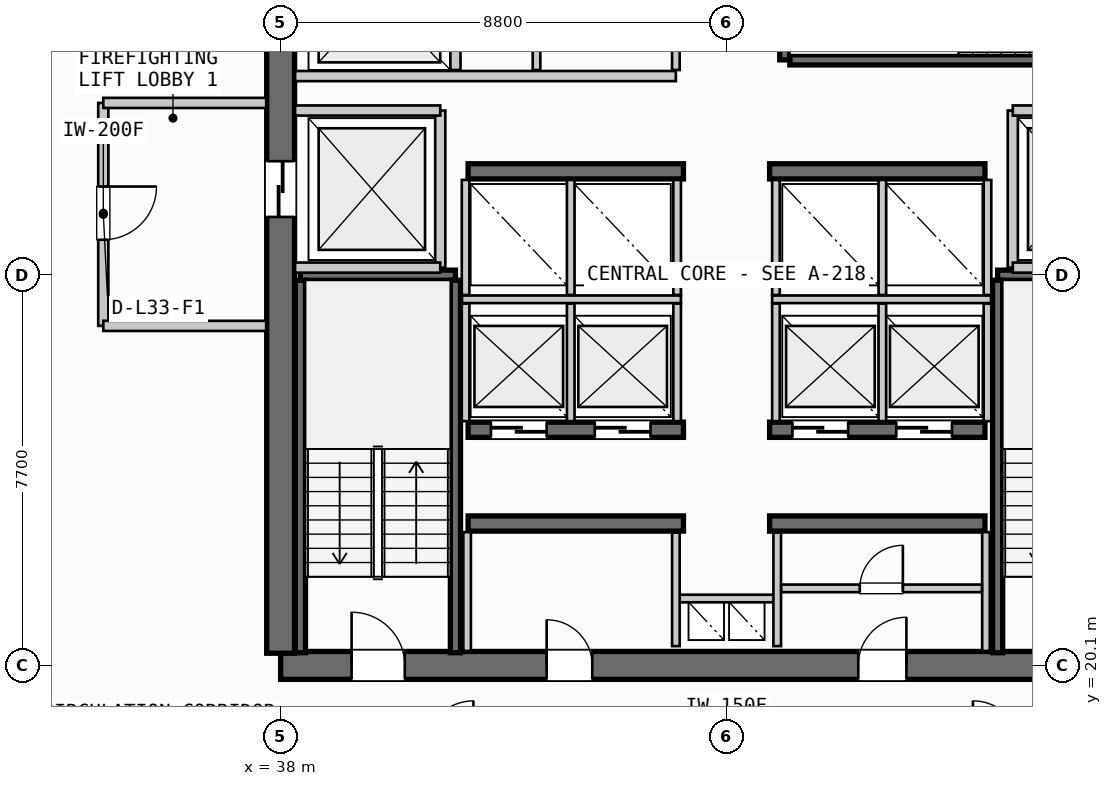
"""IFC4 building model, lengths in metres.
Left out: names, types, materials, properties, quantities, classifications, styles, units other than length and angle.
Written with IfcOpenShell. Run it as: python <this file> out.ifc"""

import sys

from ifc_helpers import new_model, si_unit, direction, frame, frame_2d, origin, place, context, subcontext, project, spatial, rectangle, extrude, source, transform, mapped, element, fill, save


model = new_model("IFC4")
c1 = context("Model", 3, precision=1e-05, world=origin(), true_north=direction((0.0, 1.0)))
c2 = subcontext(c1, "Body", "Model", "MODEL_VIEW")
j1 = project(units=[si_unit("LENGTHUNIT", "METRE"), si_unit("PLANEANGLEUNIT", "RADIAN")], contexts=[c1])
p1 = place(None, origin())
s1 = spatial("IfcSite", under=j1, at=p1, CompositionType="ELEMENT")
p2 = place(p1, origin())
s2 = spatial("IfcBuilding", under=s1, at=p2, CompositionType="ELEMENT")
p3 = place(p2, frame((0.0, 0.0, 132.35)))
s3 = spatial("IfcBuildingStorey", under=s2, at=p3, CompositionType="ELEMENT", Elevation=132.35)
p4 = place(p3, frame((38.0, 20.1, 0.0), z_axis=(0.0, 0.0, 1.0), x_axis=(1.0, 0.0, 0.0)))
e1 = element("IfcWall", 1, at=p4, inside=s3, PredefinedType="SHEAR", context=c2, shape_type="SweptSolid", body=[
    extrude(rectangle(XDim=17.6, YDim=0.55, at=frame_2d((8.8, 0.0))), origin(), (0.0, 0.0, 1.0), 3.3),
])
p5 = place(p4, frame((1.4, 0.0, 0.0)))
e2 = element("IfcOpeningElement", 2, at=p5, cuts=e1, PredefinedType="OPENING", context=c2, shape_type="SweptSolid", body=[
    extrude(rectangle(XDim=1.05, YDim=2.15, at=frame_2d((0.525, 1.075))), frame((0.0, 0.285, 0.0), z_axis=(0.0, -1.0, 0.0), x_axis=(1.0, 0.0, 0.0)), (0.0, 0.0, 1.0), 0.57),
])
p6 = place(p4, frame((15.15, 0.0, 0.0)))
e3 = element("IfcOpeningElement", 3, at=p6, cuts=e1, PredefinedType="OPENING", context=c2, shape_type="SweptSolid", body=[
    extrude(rectangle(XDim=1.05, YDim=2.15, at=frame_2d((0.525, 1.075))), frame((0.0, 0.285, 0.0), z_axis=(0.0, -1.0, 0.0), x_axis=(1.0, 0.0, 0.0)), (0.0, 0.0, 1.0), 0.57),
])
p7 = place(p4, frame((5.25, 0.0, 0.0)))
e4 = element("IfcOpeningElement", 4, at=p7, cuts=e1, PredefinedType="OPENING", context=c2, shape_type="SweptSolid", body=[
    extrude(rectangle(XDim=0.9, YDim=2.15, at=frame_2d((0.45, 1.075))), frame((0.0, 0.285, 0.0), z_axis=(0.0, -1.0, 0.0), x_axis=(1.0, 0.0, 0.0)), (0.0, 0.0, 1.0), 0.57),
])
p8 = place(p4, frame((11.4, 0.0, 0.0)))
e5 = element("IfcOpeningElement", 5, at=p8, cuts=e1, PredefinedType="OPENING", context=c2, shape_type="SweptSolid", body=[
    extrude(rectangle(XDim=0.95, YDim=2.15, at=frame_2d((0.475, 1.075))), frame((0.0, 0.285, 0.0), z_axis=(0.0, -1.0, 0.0), x_axis=(1.0, 0.0, 0.0)), (0.0, 0.0, 1.0), 0.57),
])
p9 = place(p3, frame((38.0, 35.26, 0.0), z_axis=(0.0, 0.0, 1.0), x_axis=(0.0, -1.0, 0.0)))
e6 = element("IfcWall", 6, at=p9, inside=s3, PredefinedType="SHEAR", context=c2, shape_type="SweptSolid", body=[
    extrude(rectangle(XDim=14.92, YDim=0.55, at=frame_2d((7.46, 0.0))), origin(), (0.0, 0.0, 1.0), 3.3),
])
p10 = place(p9, frame((5.21, 0.0, 0.0)))
e7 = element("IfcOpeningElement", 7, at=p10, cuts=e6, PredefinedType="OPENING", context=c2, shape_type="SweptSolid", body=[
    extrude(rectangle(XDim=1.1, YDim=2.2, at=frame_2d((0.55, 1.1))), frame((0.0, 0.285, 0.0), z_axis=(0.0, -1.0, 0.0), x_axis=(1.0, 0.0, 0.0)), (0.0, 0.0, 1.0), 0.57),
])
for number, where, z_axis, x_axis in (
    (8, (41.7, 22.9, 0.0), (0.0, 0.0, 1.0), (1.0, 0.0, 0.0)),
    (9, (47.65, 22.9, 0.0), (0.0, 0.0, 1.0), (1.0, 0.0, 0.0)),
):
    element("IfcWall", number, at=place(p3, frame(where, z_axis=z_axis, x_axis=x_axis)), inside=s3, PredefinedType="SHEAR", context=c2, shape_type="SweptSolid", body=[
        extrude(rectangle(XDim=4.25, YDim=0.3, at=frame_2d((2.125, 0.0))), origin(), (0.0, 0.0, 1.0), 3.3),
    ])
p11 = place(p3, frame((41.7, 24.75, 0.0), z_axis=(0.0, 0.0, 1.0), x_axis=(1.0, 0.0, 0.0)))
e10 = element("IfcWall", 10, at=p11, inside=s3, PredefinedType="SHEAR", context=c2, shape_type="SweptSolid", body=[
    extrude(rectangle(XDim=4.25, YDim=0.3, at=frame_2d((2.125, 0.0))), origin(), (0.0, 0.0, 1.0), 3.3),
])
p12 = place(p11, frame((0.45, 0.0, 0.0)))
e11 = element("IfcOpeningElement", 11, at=p12, cuts=e10, PredefinedType="OPENING", context=c2, shape_type="SweptSolid", body=[
    extrude(rectangle(XDim=1.1, YDim=2.2, at=frame_2d((0.55, 1.1))), frame((0.0, 0.16, 0.0), z_axis=(0.0, -1.0, 0.0), x_axis=(1.0, 0.0, 0.0)), (0.0, 0.0, 1.0), 0.32),
])
p13 = place(p11, frame((2.5, 0.0, 0.0)))
e12 = element("IfcOpeningElement", 12, at=p13, cuts=e10, PredefinedType="OPENING", context=c2, shape_type="SweptSolid", body=[
    extrude(rectangle(XDim=1.1, YDim=2.2, at=frame_2d((0.55, 1.1))), frame((0.0, 0.16, 0.0), z_axis=(0.0, -1.0, 0.0), x_axis=(1.0, 0.0, 0.0)), (0.0, 0.0, 1.0), 0.32),
])
p14 = place(p3, frame((47.65, 24.75, 0.0), z_axis=(0.0, 0.0, 1.0), x_axis=(1.0, 0.0, 0.0)))
e13 = element("IfcWall", 13, at=p14, inside=s3, PredefinedType="SHEAR", context=c2, shape_type="SweptSolid", body=[
    extrude(rectangle(XDim=4.25, YDim=0.3, at=frame_2d((2.125, 0.0))), origin(), (0.0, 0.0, 1.0), 3.3),
])
p15 = place(p14, frame((0.45, 0.0, 0.0)))
e14 = element("IfcOpeningElement", 14, at=p15, cuts=e13, PredefinedType="OPENING", context=c2, shape_type="SweptSolid", body=[
    extrude(rectangle(XDim=1.1, YDim=2.2, at=frame_2d((0.55, 1.1))), frame((0.0, 0.16, 0.0), z_axis=(0.0, -1.0, 0.0), x_axis=(1.0, 0.0, 0.0)), (0.0, 0.0, 1.0), 0.32),
])
p16 = place(p14, frame((2.5, 0.0, 0.0)))
e15 = element("IfcOpeningElement", 15, at=p16, cuts=e13, PredefinedType="OPENING", context=c2, shape_type="SweptSolid", body=[
    extrude(rectangle(XDim=1.1, YDim=2.2, at=frame_2d((0.55, 1.1))), frame((0.0, 0.16, 0.0), z_axis=(0.0, -1.0, 0.0), x_axis=(1.0, 0.0, 0.0)), (0.0, 0.0, 1.0), 0.32),
])
for number, where, z_axis, x_axis in (
    (16, (41.7, 29.85, 0.0), (0.0, 0.0, 1.0), (1.0, 0.0, 0.0)),
    (17, (47.65, 29.85, 0.0), (0.0, 0.0, 1.0), (1.0, 0.0, 0.0)),
):
    element("IfcWall", number, at=place(p3, frame(where, z_axis=z_axis, x_axis=x_axis)), inside=s3, PredefinedType="SHEAR", context=c2, shape_type="SweptSolid", body=[
        extrude(rectangle(XDim=4.25, YDim=0.3, at=frame_2d((2.125, 0.0))), origin(), (0.0, 0.0, 1.0), 3.3),
    ])
p17 = place(p3, frame((38.39, 27.8, 0.0), z_axis=(0.0, 0.0, 1.0), x_axis=(1.0, 0.0, 0.0)))
e18 = element("IfcWall", 18, at=p17, inside=s3, PredefinedType="SHEAR", context=c2, shape_type="SweptSolid", body=[
    extrude(rectangle(XDim=3.06, YDim=0.2, at=frame_2d((1.53, 0.0))), origin(), (0.0, 0.0, 1.0), 3.3),
])
for number, where, z_axis, x_axis in (
    (19, (41.45, 27.7, 0.0), (0.0, 0.0, 1.0), (0.0, -1.0, 0.0)),
    (20, (38.39, 20.35, 0.0), (0.0, 0.0, 1.0), (0.0, 1.0, 0.0)),
):
    element("IfcWall", number, at=place(p3, frame(where, z_axis=z_axis, x_axis=x_axis)), inside=s3, PredefinedType="SHEAR", context=c2, shape_type="SweptSolid", body=[
        extrude(rectangle(XDim=7.35, YDim=0.2, at=frame_2d((3.675, 0.0))), origin(), (0.0, 0.0, 1.0), 3.3),
    ])
p18 = place(p3, frame((52.15, 27.8, 0.0), z_axis=(0.0, 0.0, 1.0), x_axis=(1.0, 0.0, 0.0)))
e21 = element("IfcWall", 21, at=p18, inside=s3, PredefinedType="SHEAR", context=c2, shape_type="SweptSolid", body=[
    extrude(rectangle(XDim=3.06, YDim=0.2, at=frame_2d((1.53, 0.0))), origin(), (0.0, 0.0, 1.0), 3.3),
])
p19 = place(p3, frame((52.15, 20.35, 0.0), z_axis=(0.0, 0.0, 1.0), x_axis=(0.0, 1.0, 0.0)))
e22 = element("IfcWall", 22, at=p19, inside=s3, PredefinedType="SHEAR", context=c2, shape_type="SweptSolid", body=[
    extrude(rectangle(XDim=7.35, YDim=0.2, at=frame_2d((3.675, 0.0))), origin(), (0.0, 0.0, 1.0), 3.3),
])
p20 = place(p3, frame((47.95, 32.05, 0.0), z_axis=(0.0, 0.0, 1.0), x_axis=(0.0, 1.0, 0.0)))
e23 = element("IfcWall", 23, at=p20, inside=s3, PredefinedType="SHEAR", context=c2, shape_type="SweptSolid", body=[
    extrude(rectangle(XDim=3.06, YDim=0.2, at=frame_2d((1.53, 0.0))), origin(), (0.0, 0.0, 1.0), 3.3),
])
p21 = place(p3, frame((55.4, 32.05, 0.0), z_axis=(0.0, 0.0, 1.0), x_axis=(-1.0, 0.0, 0.0)))
e24 = element("IfcWall", 24, at=p21, inside=s3, PredefinedType="SHEAR", context=c2, shape_type="SweptSolid", body=[
    extrude(rectangle(XDim=7.35, YDim=0.2, at=frame_2d((3.675, 0.0))), origin(), (0.0, 0.0, 1.0), 3.3),
])
p22 = place(p3, frame((45.8, 21.42, 0.0), z_axis=(0.0, 0.0, 1.0), x_axis=(1.0, 0.0, 0.0)))
e25 = element("IfcWall", 25, at=p22, inside=s3, PredefinedType="PARTITIONING", context=c2, shape_type="SweptSolid", body=[
    extrude(rectangle(XDim=2.0, YDim=0.15, at=frame_2d((1.0, 0.0))), origin(), (0.0, 0.0, 1.0), 2.445),
])
for number, where, z_axis, x_axis in (
    (26, (45.8, 20.48, 0.0), (0.0, 0.0, 1.0), (0.0, 1.0, 0.0)),
    (27, (47.8, 20.48, 0.0), (0.0, 0.0, 1.0), (0.0, 1.0, 0.0)),
):
    element("IfcWall", number, at=place(p3, frame(where, z_axis=z_axis, x_axis=x_axis)), inside=s3, PredefinedType="PARTITIONING", context=c2, shape_type="SweptSolid", body=[
        extrude(rectangle(XDim=2.24, YDim=0.15, at=frame_2d((1.12, 0.0))), origin(), (0.0, 0.0, 1.0), 2.445),
    ])
p23 = place(p3, frame((41.15, 27.95, 0.0), z_axis=(0.0, 0.0, 1.0), x_axis=(0.0, 1.0, 0.0)))
e28 = element("IfcWall", 28, at=p23, inside=s3, PredefinedType="PARTITIONING", context=c2, shape_type="SweptSolid", body=[
    extrude(rectangle(XDim=3.1, YDim=0.2, at=frame_2d((1.55, 0.0))), origin(), (0.0, 0.0, 1.0), 2.445),
])
for number, where, z_axis, x_axis in (
    (29, (38.285, 27.95, 0.0), (0.0, 0.0, 1.0), (1.0, 0.0, 0.0)),
    (30, (38.285, 31.05, 0.0), (0.0, 0.0, 1.0), (1.0, 0.0, 0.0)),
):
    element("IfcWall", number, at=place(p3, frame(where, z_axis=z_axis, x_axis=x_axis)), inside=s3, PredefinedType="PARTITIONING", context=c2, shape_type="SweptSolid", body=[
        extrude(rectangle(XDim=2.865, YDim=0.2, at=frame_2d((1.433, 0.0))), origin(), (0.0, 0.0, 1.0), 2.445),
    ])
p24 = place(p3, frame((34.5, 31.2, 0.0), z_axis=(0.0, 0.0, 1.0), x_axis=(0.0, -1.0, 0.0)))
e31 = element("IfcWall", 31, at=p24, inside=s3, PredefinedType="PARTITIONING", context=c2, shape_type="SweptSolid", body=[
    extrude(rectangle(XDim=4.4, YDim=0.2, at=frame_2d((2.2, 0.0))), origin(), (0.0, 0.0, 1.0), 2.445),
])
p25 = place(p24, frame((1.65, 0.0, 0.0)))
e32 = element("IfcOpeningElement", 32, at=p25, cuts=e31, PredefinedType="OPENING", context=c2, shape_type="SweptSolid", body=[
    extrude(rectangle(XDim=1.05, YDim=2.15, at=frame_2d((0.525, 1.075))), frame((0.0, 0.11, 0.0), z_axis=(0.0, -1.0, 0.0), x_axis=(1.0, 0.0, 0.0)), (0.0, 0.0, 1.0), 0.22),
])
for number, where, z_axis, x_axis in (
    (33, (34.5, 26.8, 0.0), (0.0, 0.0, 1.0), (1.0, 0.0, 0.0)),
    (34, (34.5, 31.2, 0.0), (0.0, 0.0, 1.0), (1.0, 0.0, 0.0)),
):
    element("IfcWall", number, at=place(p3, frame(where, z_axis=z_axis, x_axis=x_axis)), inside=s3, PredefinedType="PARTITIONING", context=c2, shape_type="SweptSolid", body=[
        extrude(rectangle(XDim=3.215, YDim=0.2, at=frame_2d((1.607, 0.0))), origin(), (0.0, 0.0, 1.0), 2.445),
    ])
p26 = place(p3, frame((52.45, 27.95, 0.0), z_axis=(0.0, 0.0, 1.0), x_axis=(0.0, 1.0, 0.0)))
e35 = element("IfcWall", 35, at=p26, inside=s3, PredefinedType="PARTITIONING", context=c2, shape_type="SweptSolid", body=[
    extrude(rectangle(XDim=3.1, YDim=0.2, at=frame_2d((1.55, 0.0))), origin(), (0.0, 0.0, 1.0), 2.445),
])
for number, where, z_axis, x_axis in (
    (36, (52.45, 27.95, 0.0), (0.0, 0.0, 1.0), (1.0, 0.0, 0.0)),
    (37, (52.45, 31.05, 0.0), (0.0, 0.0, 1.0), (1.0, 0.0, 0.0)),
):
    element("IfcWall", number, at=place(p3, frame(where, z_axis=z_axis, x_axis=x_axis)), inside=s3, PredefinedType="PARTITIONING", context=c2, shape_type="SweptSolid", body=[
        extrude(rectangle(XDim=2.865, YDim=0.2, at=frame_2d((1.433, 0.0))), origin(), (0.0, 0.0, 1.0), 2.445),
    ])
for number, where, z_axis, x_axis in (
    (38, (41.68, 20.385, 0.0), (0.0, 0.0, 1.0), (0.0, 1.0, 0.0)),
    (39, (51.92, 20.385, 0.0), (0.0, 0.0, 1.0), (0.0, 1.0, 0.0)),
):
    element("IfcWall", number, at=place(p3, frame(where, z_axis=z_axis, x_axis=x_axis)), inside=s3, PredefinedType="PARTITIONING", context=c2, shape_type="SweptSolid", body=[
        extrude(rectangle(XDim=2.345, YDim=0.15, at=frame_2d((1.172, 0.0))), origin(), (0.0, 0.0, 1.0), 2.445),
    ])
p27 = place(p3, frame((47.88, 21.62, 0.0), z_axis=(0.0, 0.0, 1.0), x_axis=(1.0, 0.0, 0.0)))
e40 = element("IfcWall", 40, at=p27, inside=s3, PredefinedType="PARTITIONING", context=c2, shape_type="SweptSolid", body=[
    extrude(rectangle(XDim=3.96, YDim=0.15, at=frame_2d((1.98, 0.0))), origin(), (0.0, 0.0, 1.0), 2.445),
])
p28 = place(p27, frame((1.55, 0.0, 0.0)))
e41 = element("IfcOpeningElement", 41, at=p28, cuts=e40, PredefinedType="OPENING", context=c2, shape_type="SweptSolid", body=[
    extrude(rectangle(XDim=0.85, YDim=2.15, at=frame_2d((0.425, 1.075))), frame((0.0, 0.085, 0.0), z_axis=(0.0, -1.0, 0.0), x_axis=(1.0, 0.0, 0.0)), (0.0, 0.0, 1.0), 0.17),
])
p29 = place(p3, frame((41.58, 27.325, 0.0), z_axis=(0.0, 0.0, 1.0), x_axis=(1.0, 0.0, 0.0)))
e42 = element("IfcWall", 42, at=p29, inside=s3, PredefinedType="PARTITIONING", context=c2, shape_type="SweptSolid", body=[
    extrude(rectangle(XDim=4.32, YDim=0.15, at=frame_2d((2.16, 0.0))), origin(), (0.0, 0.0, 1.0), 2.445),
])
p30 = place(p3, frame((47.7, 27.325, 0.0), z_axis=(0.0, 0.0, 1.0), x_axis=(1.0, 0.0, 0.0)))
e43 = element("IfcWall", 43, at=p30, inside=s3, PredefinedType="PARTITIONING", context=c2, shape_type="SweptSolid", body=[
    extrude(rectangle(XDim=4.32, YDim=0.15, at=frame_2d((2.16, 0.0))), origin(), (0.0, 0.0, 1.0), 2.445),
])
for number, where, z_axis, x_axis in (
    (44, (41.65, 24.92, 0.0), (0.0, 0.0, 1.0), (0.0, 1.0, 0.0)),
    (45, (43.725, 24.92, 0.0), (0.0, 0.0, 1.0), (0.0, 1.0, 0.0)),
    (46, (45.825, 24.92, 0.0), (0.0, 0.0, 1.0), (0.0, 1.0, 0.0)),
    (47, (47.775, 24.92, 0.0), (0.0, 0.0, 1.0), (0.0, 1.0, 0.0)),
    (48, (49.875, 24.92, 0.0), (0.0, 0.0, 1.0), (0.0, 1.0, 0.0)),
    (49, (51.95, 24.92, 0.0), (0.0, 0.0, 1.0), (0.0, 1.0, 0.0)),
):
    element("IfcWall", number, at=place(p3, frame(where, z_axis=z_axis, x_axis=x_axis)), inside=s3, PredefinedType="PARTITIONING", context=c2, shape_type="SweptSolid", body=[
        extrude(rectangle(XDim=2.32, YDim=0.15, at=frame_2d((1.16, 0.0))), origin(), (0.0, 0.0, 1.0), 2.445),
    ])
for number, where, z_axis, x_axis in (
    (50, (41.65, 27.41, 0.0), (0.0, 0.0, 1.0), (0.0, 1.0, 0.0)),
    (51, (43.725, 27.41, 0.0), (0.0, 0.0, 1.0), (0.0, 1.0, 0.0)),
    (52, (45.825, 27.41, 0.0), (0.0, 0.0, 1.0), (0.0, 1.0, 0.0)),
    (53, (47.775, 27.41, 0.0), (0.0, 0.0, 1.0), (0.0, 1.0, 0.0)),
    (54, (49.875, 27.41, 0.0), (0.0, 0.0, 1.0), (0.0, 1.0, 0.0)),
    (55, (51.95, 27.41, 0.0), (0.0, 0.0, 1.0), (0.0, 1.0, 0.0)),
):
    element("IfcWall", number, at=place(p3, frame(where, z_axis=z_axis, x_axis=x_axis)), inside=s3, PredefinedType="PARTITIONING", context=c2, shape_type="SweptSolid", body=[
        extrude(rectangle(XDim=2.27, YDim=0.15, at=frame_2d((1.135, 0.0))), origin(), (0.0, 0.0, 1.0), 2.445),
    ])
p31 = place(p3, frame((41.45, 31.85, 0.0), z_axis=(0.0, 0.0, 1.0), x_axis=(0.0, 1.0, 0.0)))
e56 = element("IfcWall", 56, at=p31, inside=s3, PredefinedType="PARTITIONING", context=c2, shape_type="SweptSolid", body=[
    extrude(rectangle(XDim=3.365, YDim=0.2, at=frame_2d((1.683, 0.0))), origin(), (0.0, 0.0, 1.0), 2.445),
])
p32 = place(p3, frame((38.285, 31.73, 0.0), z_axis=(0.0, 0.0, 1.0), x_axis=(1.0, 0.0, 0.0)))
e57 = element("IfcWall", 57, at=p32, inside=s3, PredefinedType="PARTITIONING", context=c2, shape_type="SweptSolid", body=[
    extrude(rectangle(XDim=7.515, YDim=0.2, at=frame_2d((3.758, 0.0))), origin(), (0.0, 0.0, 1.0), 2.445),
])
p33 = place(p3, frame((45.8, 31.85, 0.0), z_axis=(0.0, 0.0, 1.0), x_axis=(0.0, 1.0, 0.0)))
e58 = element("IfcWall", 58, at=p33, inside=s3, PredefinedType="PARTITIONING", context=c2, shape_type="SweptSolid", body=[
    extrude(rectangle(XDim=3.365, YDim=0.15, at=frame_2d((1.683, 0.0))), origin(), (0.0, 0.0, 1.0), 2.445),
])
p34 = place(p3, frame((43.05, 31.85, 0.0), z_axis=(0.0, 0.0, 1.0), x_axis=(0.0, 1.0, 0.0)))
e59 = element("IfcWall", 59, at=p34, inside=s3, PredefinedType="PLUMBINGWALL", context=c2, shape_type="SweptSolid", body=[
    extrude(rectangle(XDim=3.365, YDim=0.15, at=frame_2d((1.683, 0.0))), origin(), (0.0, 0.0, 1.0), 2.445),
])
m1 = source(origin(), c2, "Body", "SweptSolid", [
    extrude(rectangle(XDim=1.05, YDim=2.15, at=frame_2d((0.525, 1.075))), frame((0.0, 0.025, 0.0), z_axis=(0.0, -1.0, 0.0), x_axis=(1.0, 0.0, 0.0)), (0.0, 0.0, 1.0), 0.05),
])
p35 = place(p5, origin())
e60 = element("IfcDoor", 60, at=p35, inside=s3, OperationType="SINGLE_SWING_LEFT", PredefinedType="DOOR", context=c2, shape_type="MappedRepresentation", body=[
    mapped(m1, transform((0.0, 0.0, 0.0), scale=1.0)),
])
fill(e2, e60)
m2 = source(origin(), c2, "Body", "SweptSolid", [
    extrude(rectangle(XDim=1.1, YDim=2.2, at=frame_2d((0.55, 1.1))), frame((0.0, 0.025, 0.0), z_axis=(0.0, -1.0, 0.0), x_axis=(1.0, 0.0, 0.0)), (0.0, 0.0, 1.0), 0.05),
])
p36 = place(p10, origin())
e61 = element("IfcDoor", 61, at=p36, inside=s3, OperationType="SLIDING_TO_LEFT", PredefinedType="DOOR", context=c2, shape_type="MappedRepresentation", body=[
    mapped(m2, transform((0.0, 0.0, 0.0), scale=1.0)),
])
fill(e7, e61)
m3 = source(origin(), c2, "Body", "SweptSolid", [
    extrude(rectangle(XDim=0.9, YDim=2.15, at=frame_2d((0.45, 1.075))), frame((0.0, 0.025, 0.0), z_axis=(0.0, -1.0, 0.0), x_axis=(1.0, 0.0, 0.0)), (0.0, 0.0, 1.0), 0.05),
])
p37 = place(p7, origin())
e62 = element("IfcDoor", 62, at=p37, inside=s3, OperationType="SINGLE_SWING_LEFT", PredefinedType="DOOR", context=c2, shape_type="MappedRepresentation", body=[
    mapped(m3, transform((0.0, 0.0, 0.0), scale=1.0)),
])
fill(e4, e62)
m4 = source(origin(), c2, "Body", "SweptSolid", [
    extrude(rectangle(XDim=0.95, YDim=2.15, at=frame_2d((0.475, 1.075))), frame((0.0, 0.025, 0.0), z_axis=(0.0, -1.0, 0.0), x_axis=(1.0, 0.0, 0.0)), (0.0, 0.0, 1.0), 0.05),
])
p38 = place(p8, origin())
e63 = element("IfcDoor", 63, at=p38, inside=s3, OperationType="SINGLE_SWING_RIGHT", PredefinedType="DOOR", context=c2, shape_type="MappedRepresentation", body=[
    mapped(m4, transform((0.0, 0.0, 0.0), scale=1.0)),
])
fill(e5, e63)
p39 = place(p12, origin())
e64 = element("IfcDoor", 64, at=p39, inside=s3, OperationType="SLIDING_TO_RIGHT", PredefinedType="DOOR", context=c2, shape_type="MappedRepresentation", body=[
    mapped(m2, transform((0.0, 0.0, 0.0), scale=1.0)),
])
fill(e11, e64)
p40 = place(p13, origin())
e65 = element("IfcDoor", 65, at=p40, inside=s3, OperationType="SLIDING_TO_RIGHT", PredefinedType="DOOR", context=c2, shape_type="MappedRepresentation", body=[
    mapped(m2, transform((0.0, 0.0, 0.0), scale=1.0)),
])
fill(e12, e65)
p41 = place(p15, origin())
e66 = element("IfcDoor", 66, at=p41, inside=s3, OperationType="SLIDING_TO_RIGHT", PredefinedType="DOOR", context=c2, shape_type="MappedRepresentation", body=[
    mapped(m2, transform((0.0, 0.0, 0.0), scale=1.0)),
])
fill(e14, e66)
p42 = place(p16, origin())
e67 = element("IfcDoor", 67, at=p42, inside=s3, OperationType="SLIDING_TO_RIGHT", PredefinedType="DOOR", context=c2, shape_type="MappedRepresentation", body=[
    mapped(m2, transform((0.0, 0.0, 0.0), scale=1.0)),
])
fill(e15, e67)
p43 = place(p25, origin())
e68 = element("IfcDoor", 68, at=p43, inside=s3, OperationType="SINGLE_SWING_LEFT", PredefinedType="DOOR", context=c2, shape_type="MappedRepresentation", body=[
    mapped(m1, transform((0.0, 0.0, 0.0), scale=1.0)),
])
fill(e32, e68)
m5 = source(origin(), c2, "Body", "SweptSolid", [
    extrude(rectangle(XDim=0.85, YDim=2.15, at=frame_2d((0.425, 1.075))), frame((0.0, 0.025, 0.0), z_axis=(0.0, -1.0, 0.0), x_axis=(1.0, 0.0, 0.0)), (0.0, 0.0, 1.0), 0.05),
])
p44 = place(p28, origin())
e69 = element("IfcDoor", 69, at=p44, inside=s3, OperationType="SINGLE_SWING_RIGHT", PredefinedType="DOOR", context=c2, shape_type="MappedRepresentation", body=[
    mapped(m5, transform((0.0, 0.0, 0.0), scale=1.0)),
])
fill(e41, e69)
save(model, sys.argv[1])
